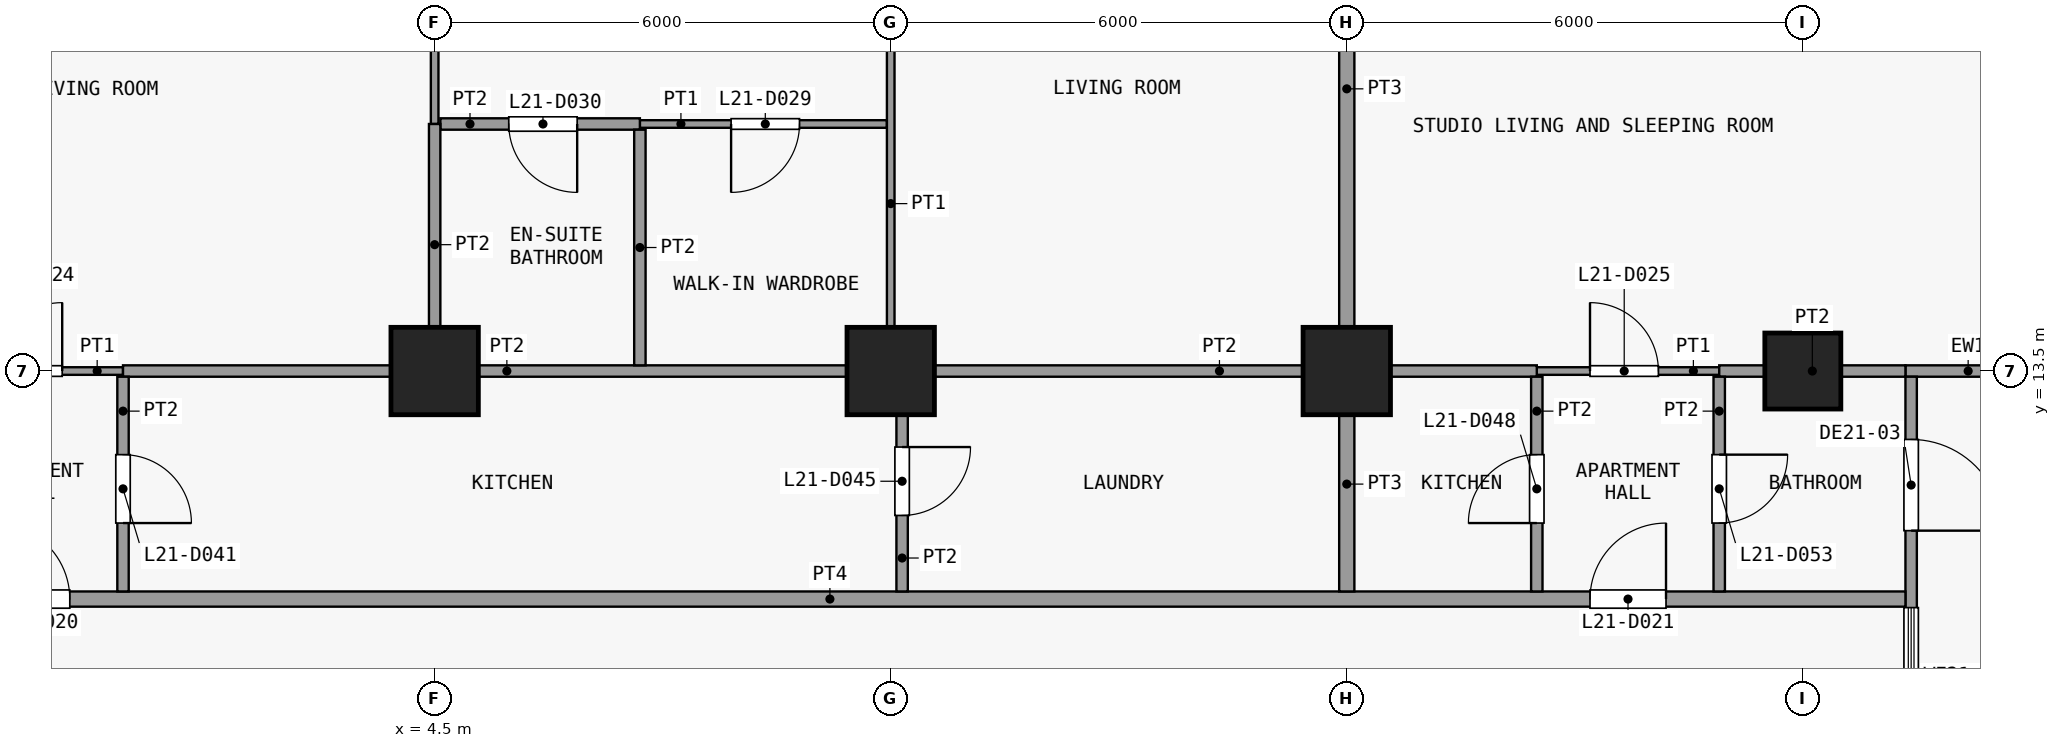
"""IFC4 building model, lengths in metres.
Left out: names, types, materials, properties, quantities, classifications, styles, units other than length and angle.
Written with IfcOpenShell. Run it as: python <this file> out.ifc"""

import sys

from ifc_helpers import new_model, si_unit, direction, frame, frame_2d, origin, origin_2d, place, context, subcontext, project, spatial, rectangle, extrude, element, fill, save


model = new_model("IFC4")
c1 = context("Model", 3, precision=1e-05, world=origin(), true_north=direction((0.0, 1.0)))
c2 = subcontext(c1, "Body", "Model", "MODEL_VIEW")
j1 = project(units=[si_unit("LENGTHUNIT", "METRE"), si_unit("PLANEANGLEUNIT", "RADIAN")], contexts=[c1])
p1 = place(None, origin())
s1 = spatial("IfcSite", under=j1, at=p1, CompositionType="ELEMENT")
p2 = place(p1, origin())
s2 = spatial("IfcBuilding", under=s1, at=p2, CompositionType="ELEMENT")
p3 = place(p2, frame((0.0, 0.0, 88.3)))
s3 = spatial("IfcBuildingStorey", under=s2, at=p3, CompositionType="ELEMENT", Elevation=88.3)
for number, where, z_axis, x_axis in (
    (1, (4.5, 13.5, 0.0), (0.0, 0.0, 1.0), (1.0, 0.0, 0.0)),
    (2, (10.5, 13.5, 0.0), (0.0, 0.0, 1.0), (1.0, 0.0, 0.0)),
    (3, (16.5, 13.5, 0.0), (0.0, 0.0, 1.0), (1.0, 0.0, 0.0)),
):
    element("IfcColumn", number, at=place(p3, frame(where, z_axis=z_axis, x_axis=x_axis)), inside=s3, PredefinedType="COLUMN", context=c2, shape_type="SweptSolid", body=[
        extrude(rectangle(XDim=1.15, YDim=1.15, at=origin_2d()), origin(), (0.0, 0.0, 1.0), 3.6),
    ])
p4 = place(p3, frame((22.5, 13.5, 0.0), z_axis=(0.0, 0.0, 1.0), x_axis=(1.0, 0.0, 0.0)))
e4 = element("IfcColumn", 4, at=p4, inside=s3, PredefinedType="COLUMN", context=c2, shape_type="SweptSolid", body=[
    extrude(rectangle(XDim=1.0, YDim=1.0, at=origin_2d()), origin(), (0.0, 0.0, 1.0), 3.6),
])
p5 = place(p3, frame((23.85, 13.5, 0.0), z_axis=(0.0, 0.0, 1.0), x_axis=(1.0, 0.0, 0.0)))
e5 = element("IfcWall", 5, at=p5, inside=s3, PredefinedType="SOLIDWALL", context=c2, shape_type="SweptSolid", body=[
    extrude(rectangle(XDim=1.65, YDim=0.15, at=frame_2d((0.825, 0.0))), origin(), (0.0, 0.0, 1.0), 3.3),
])
p6 = place(p3, frame((23.925, 13.425, 0.0), z_axis=(0.0, 0.0, 1.0), x_axis=(0.0, -1.0, 0.0)))
e6 = element("IfcWall", 6, at=p6, inside=s3, PredefinedType="SOLIDWALL", context=c2, shape_type="SweptSolid", body=[
    extrude(rectangle(XDim=5.85, YDim=0.15, at=frame_2d((2.925, 0.0))), origin(), (0.0, 0.0, 1.0), 3.3),
])
p7 = place(p6, frame((0.825, 0.0, 0.0)))
e7 = element("IfcOpeningElement", 7, at=p7, cuts=e6, PredefinedType="OPENING", context=c2, shape_type="SweptSolid", body=[
    extrude(rectangle(XDim=1.2, YDim=2.4, at=frame_2d((0.6, 1.2))), frame((0.0, 0.085, 0.0), z_axis=(0.0, -1.0, 0.0), x_axis=(1.0, 0.0, 0.0)), (0.0, 0.0, 1.0), 0.17),
])
p8 = place(p6, frame((3.038, 0.0, 0.9)))
e8 = element("IfcOpeningElement", 8, at=p8, cuts=e6, PredefinedType="OPENING", context=c2, shape_type="SweptSolid", body=[
    extrude(rectangle(XDim=1.8, YDim=2.1, at=frame_2d((0.9, 1.05))), frame((0.0, 0.085, 0.0), z_axis=(0.0, -1.0, 0.0), x_axis=(1.0, 0.0, 0.0)), (0.0, 0.0, 1.0), 0.17),
])
p9 = place(p3, frame((-25.35, 10.5, 0.0), z_axis=(0.0, 0.0, 1.0), x_axis=(1.0, 0.0, 0.0)))
e9 = element("IfcWall", 9, at=p9, inside=s3, PredefinedType="PARTITIONING", context=c2, shape_type="SweptSolid", body=[
    extrude(rectangle(XDim=49.2, YDim=0.2, at=frame_2d((24.6, 0.0))), origin(), (0.0, 0.0, 1.0), 3.3),
])
p10 = place(p9, frame((7.05, 0.0, 0.0)))
e10 = element("IfcOpeningElement", 10, at=p10, cuts=e9, PredefinedType="OPENING", context=c2, shape_type="SweptSolid", body=[
    extrude(rectangle(XDim=1.0, YDim=2.1, at=frame_2d((0.5, 1.05))), frame((0.0, 0.11, 0.0), z_axis=(0.0, -1.0, 0.0), x_axis=(1.0, 0.0, 0.0)), (0.0, 0.0, 1.0), 0.22),
])
p11 = place(p9, frame((15.55, 0.0, 0.0)))
e11 = element("IfcOpeningElement", 11, at=p11, cuts=e9, PredefinedType="OPENING", context=c2, shape_type="SweptSolid", body=[
    extrude(rectangle(XDim=1.0, YDim=2.1, at=frame_2d((0.5, 1.05))), frame((0.0, 0.11, 0.0), z_axis=(0.0, -1.0, 0.0), x_axis=(1.0, 0.0, 0.0)), (0.0, 0.0, 1.0), 0.22),
])
p12 = place(p9, frame((24.05, 0.0, 0.0)))
e12 = element("IfcOpeningElement", 12, at=p12, cuts=e9, PredefinedType="OPENING", context=c2, shape_type="SweptSolid", body=[
    extrude(rectangle(XDim=1.0, YDim=2.1, at=frame_2d((0.5, 1.05))), frame((0.0, 0.11, 0.0), z_axis=(0.0, -1.0, 0.0), x_axis=(1.0, 0.0, 0.0)), (0.0, 0.0, 1.0), 0.22),
])
p13 = place(p9, frame((45.05, 0.0, 0.0)))
e13 = element("IfcOpeningElement", 13, at=p13, cuts=e9, PredefinedType="OPENING", context=c2, shape_type="SweptSolid", body=[
    extrude(rectangle(XDim=1.0, YDim=2.1, at=frame_2d((0.5, 1.05))), frame((0.0, 0.11, 0.0), z_axis=(0.0, -1.0, 0.0), x_axis=(1.0, 0.0, 0.0)), (0.0, 0.0, 1.0), 0.22),
])
p14 = place(p3, frame((-2.0, 13.5, 0.0), z_axis=(0.0, 0.0, 1.0), x_axis=(1.0, 0.0, 0.0)))
e14 = element("IfcWall", 14, at=p14, inside=s3, PredefinedType="PARTITIONING", context=c2, shape_type="SweptSolid", body=[
    extrude(rectangle(XDim=2.4, YDim=0.1, at=frame_2d((1.2, 0.0))), origin(), (0.0, 0.0, 1.0), 3.3),
])
p15 = place(p14, frame((0.7, 0.0, 0.0)))
e15 = element("IfcOpeningElement", 15, at=p15, cuts=e14, PredefinedType="OPENING", context=c2, shape_type="SweptSolid", body=[
    extrude(rectangle(XDim=0.9, YDim=2.1, at=frame_2d((0.45, 1.05))), frame((0.0, 0.06, 0.0), z_axis=(0.0, -1.0, 0.0), x_axis=(1.0, 0.0, 0.0)), (0.0, 0.0, 1.0), 0.12),
])
p16 = place(p3, frame((19.0, 13.5, 0.0), z_axis=(0.0, 0.0, 1.0), x_axis=(1.0, 0.0, 0.0)))
e16 = element("IfcWall", 16, at=p16, inside=s3, PredefinedType="PARTITIONING", context=c2, shape_type="SweptSolid", body=[
    extrude(rectangle(XDim=2.4, YDim=0.1, at=frame_2d((1.2, 0.0))), origin(), (0.0, 0.0, 1.0), 3.3),
])
p17 = place(p16, frame((0.7, 0.0, 0.0)))
e17 = element("IfcOpeningElement", 17, at=p17, cuts=e16, PredefinedType="OPENING", context=c2, shape_type="SweptSolid", body=[
    extrude(rectangle(XDim=0.9, YDim=2.1, at=frame_2d((0.45, 1.05))), frame((0.0, 0.06, 0.0), z_axis=(0.0, -1.0, 0.0), x_axis=(1.0, 0.0, 0.0)), (0.0, 0.0, 1.0), 0.12),
])
p18 = place(p3, frame((0.4, 13.5, 0.0), z_axis=(0.0, 0.0, 1.0), x_axis=(1.0, 0.0, 0.0)))
e18 = element("IfcWall", 18, at=p18, inside=s3, PredefinedType="PARTITIONING", context=c2, shape_type="SweptSolid", body=[
    extrude(rectangle(XDim=10.1, YDim=0.15, at=frame_2d((5.05, 0.0))), origin(), (0.0, 0.0, 1.0), 3.3),
])
p19 = place(p3, frame((10.65, 13.5, 0.0), z_axis=(0.0, 0.0, 1.0), x_axis=(1.0, 0.0, 0.0)))
e19 = element("IfcWall", 19, at=p19, inside=s3, PredefinedType="PARTITIONING", context=c2, shape_type="SweptSolid", body=[
    extrude(rectangle(XDim=8.35, YDim=0.15, at=frame_2d((4.175, 0.0))), origin(), (0.0, 0.0, 1.0), 3.3),
])
p20 = place(p3, frame((21.4, 13.5, 0.0), z_axis=(0.0, 0.0, 1.0), x_axis=(1.0, 0.0, 0.0)))
e20 = element("IfcWall", 20, at=p20, inside=s3, PredefinedType="PARTITIONING", context=c2, shape_type="SweptSolid", body=[
    extrude(rectangle(XDim=2.45, YDim=0.15, at=frame_2d((1.225, 0.0))), origin(), (0.0, 0.0, 1.0), 3.3),
])
p21 = place(p3, frame((7.2, 16.75, 0.0), z_axis=(0.0, 0.0, 1.0), x_axis=(1.0, 0.0, 0.0)))
e21 = element("IfcWall", 21, at=p21, inside=s3, PredefinedType="PARTITIONING", context=c2, shape_type="SweptSolid", body=[
    extrude(rectangle(XDim=3.25, YDim=0.1, at=frame_2d((1.625, 0.0))), origin(), (0.0, 0.0, 1.0), 3.3),
])
p22 = place(p21, frame((1.2, 0.0, 0.0)))
e22 = element("IfcOpeningElement", 22, at=p22, cuts=e21, PredefinedType="OPENING", context=c2, shape_type="SweptSolid", body=[
    extrude(rectangle(XDim=0.9, YDim=2.1, at=frame_2d((0.45, 1.05))), frame((0.0, 0.06, 0.0), z_axis=(0.0, -1.0, 0.0), x_axis=(1.0, 0.0, 0.0)), (0.0, 0.0, 1.0), 0.12),
])
p23 = place(p3, frame((4.575, 16.75, 0.0), z_axis=(0.0, 0.0, 1.0), x_axis=(1.0, 0.0, 0.0)))
e23 = element("IfcWall", 23, at=p23, inside=s3, PredefinedType="PARTITIONING", context=c2, shape_type="SweptSolid", body=[
    extrude(rectangle(XDim=2.625, YDim=0.15, at=frame_2d((1.312, 0.0))), origin(), (0.0, 0.0, 1.0), 3.3),
])
p24 = place(p23, frame((0.9, 0.0, 0.0)))
e24 = element("IfcOpeningElement", 24, at=p24, cuts=e23, PredefinedType="OPENING", context=c2, shape_type="SweptSolid", body=[
    extrude(rectangle(XDim=0.9, YDim=2.1, at=frame_2d((0.45, 1.05))), frame((0.0, 0.085, 0.0), z_axis=(0.0, -1.0, 0.0), x_axis=(1.0, 0.0, 0.0)), (0.0, 0.0, 1.0), 0.17),
])
p25 = place(p3, frame((0.4, 10.6, 0.0), z_axis=(0.0, 0.0, 1.0), x_axis=(0.0, 1.0, 0.0)))
e25 = element("IfcWall", 25, at=p25, inside=s3, PredefinedType="PARTITIONING", context=c2, shape_type="SweptSolid", body=[
    extrude(rectangle(XDim=2.825, YDim=0.15, at=frame_2d((1.413, 0.0))), origin(), (0.0, 0.0, 1.0), 3.3),
])
p26 = place(p25, frame((0.9, 0.0, 0.0)))
e26 = element("IfcOpeningElement", 26, at=p26, cuts=e25, PredefinedType="OPENING", context=c2, shape_type="SweptSolid", body=[
    extrude(rectangle(XDim=0.9, YDim=2.1, at=frame_2d((0.45, 1.05))), frame((0.0, 0.085, 0.0), z_axis=(0.0, -1.0, 0.0), x_axis=(1.0, 0.0, 0.0)), (0.0, 0.0, 1.0), 0.17),
])
p27 = place(p3, frame((4.5, 16.75, 0.0), z_axis=(0.0, 0.0, 1.0), x_axis=(0.0, 1.0, 0.0)))
e27 = element("IfcWall", 27, at=p27, inside=s3, PredefinedType="PARTITIONING", context=c2, shape_type="SweptSolid", body=[
    extrude(rectangle(XDim=4.1, YDim=0.1, at=frame_2d((2.05, 0.0))), origin(), (0.0, 0.0, 1.0), 3.3),
])
p28 = place(p27, frame((1.2, 0.0, 0.0)))
e28 = element("IfcOpeningElement", 28, at=p28, cuts=e27, PredefinedType="OPENING", context=c2, shape_type="SweptSolid", body=[
    extrude(rectangle(XDim=0.9, YDim=2.1, at=frame_2d((0.45, 1.05))), frame((0.0, 0.06, 0.0), z_axis=(0.0, -1.0, 0.0), x_axis=(1.0, 0.0, 0.0)), (0.0, 0.0, 1.0), 0.12),
])
p29 = place(p3, frame((4.5, 13.575, 0.0), z_axis=(0.0, 0.0, 1.0), x_axis=(0.0, 1.0, 0.0)))
e29 = element("IfcWall", 29, at=p29, inside=s3, PredefinedType="PARTITIONING", context=c2, shape_type="SweptSolid", body=[
    extrude(rectangle(XDim=3.175, YDim=0.15, at=frame_2d((1.587, 0.0))), origin(), (0.0, 0.0, 1.0), 3.3),
])
p30 = place(p3, frame((7.2, 13.575, 0.0), z_axis=(0.0, 0.0, 1.0), x_axis=(0.0, 1.0, 0.0)))
e30 = element("IfcWall", 30, at=p30, inside=s3, PredefinedType="PARTITIONING", context=c2, shape_type="SweptSolid", body=[
    extrude(rectangle(XDim=3.1, YDim=0.15, at=frame_2d((1.55, 0.0))), origin(), (0.0, 0.0, 1.0), 3.3),
])
p31 = place(p3, frame((10.5, 13.575, 0.0), z_axis=(0.0, 0.0, 1.0), x_axis=(0.0, 1.0, 0.0)))
e31 = element("IfcWall", 31, at=p31, inside=s3, PredefinedType="PARTITIONING", context=c2, shape_type="SweptSolid", body=[
    extrude(rectangle(XDim=7.275, YDim=0.1, at=frame_2d((3.638, 0.0))), origin(), (0.0, 0.0, 1.0), 3.3),
])
p32 = place(p31, frame((4.375, 0.0, 0.0)))
e32 = element("IfcOpeningElement", 32, at=p32, cuts=e31, PredefinedType="OPENING", context=c2, shape_type="SweptSolid", body=[
    extrude(rectangle(XDim=0.9, YDim=2.1, at=frame_2d((0.45, 1.05))), frame((0.0, 0.06, 0.0), z_axis=(0.0, -1.0, 0.0), x_axis=(1.0, 0.0, 0.0)), (0.0, 0.0, 1.0), 0.12),
])
p33 = place(p3, frame((10.65, 10.6, 0.0), z_axis=(0.0, 0.0, 1.0), x_axis=(0.0, 1.0, 0.0)))
e33 = element("IfcWall", 33, at=p33, inside=s3, PredefinedType="PARTITIONING", context=c2, shape_type="SweptSolid", body=[
    extrude(rectangle(XDim=2.825, YDim=0.15, at=frame_2d((1.413, 0.0))), origin(), (0.0, 0.0, 1.0), 3.3),
])
p34 = place(p33, frame((1.0, 0.0, 0.0)))
e34 = element("IfcOpeningElement", 34, at=p34, cuts=e33, PredefinedType="OPENING", context=c2, shape_type="SweptSolid", body=[
    extrude(rectangle(XDim=0.9, YDim=2.1, at=frame_2d((0.45, 1.05))), frame((0.0, 0.085, 0.0), z_axis=(0.0, -1.0, 0.0), x_axis=(1.0, 0.0, 0.0)), (0.0, 0.0, 1.0), 0.17),
])
p35 = place(p3, frame((16.5, 10.6, 0.0), z_axis=(0.0, 0.0, 1.0), x_axis=(0.0, 1.0, 0.0)))
e35 = element("IfcWall", 35, at=p35, inside=s3, PredefinedType="PARTITIONING", context=c2, shape_type="SweptSolid", body=[
    extrude(rectangle(XDim=2.825, YDim=0.2, at=frame_2d((1.413, 0.0))), origin(), (0.0, 0.0, 1.0), 3.3),
])
p36 = place(p3, frame((16.5, 13.575, 0.0), z_axis=(0.0, 0.0, 1.0), x_axis=(0.0, 1.0, 0.0)))
e36 = element("IfcWall", 36, at=p36, inside=s3, PredefinedType="PARTITIONING", context=c2, shape_type="SweptSolid", body=[
    extrude(rectangle(XDim=7.275, YDim=0.2, at=frame_2d((3.638, 0.0))), origin(), (0.0, 0.0, 1.0), 3.3),
])
p37 = place(p3, frame((19.0, 10.6, 0.0), z_axis=(0.0, 0.0, 1.0), x_axis=(0.0, 1.0, 0.0)))
e37 = element("IfcWall", 37, at=p37, inside=s3, PredefinedType="PARTITIONING", context=c2, shape_type="SweptSolid", body=[
    extrude(rectangle(XDim=2.825, YDim=0.15, at=frame_2d((1.413, 0.0))), origin(), (0.0, 0.0, 1.0), 3.3),
])
p38 = place(p37, frame((0.9, 0.0, 0.0)))
e38 = element("IfcOpeningElement", 38, at=p38, cuts=e37, PredefinedType="OPENING", context=c2, shape_type="SweptSolid", body=[
    extrude(rectangle(XDim=0.9, YDim=2.1, at=frame_2d((0.45, 1.05))), frame((0.0, 0.085, 0.0), z_axis=(0.0, -1.0, 0.0), x_axis=(1.0, 0.0, 0.0)), (0.0, 0.0, 1.0), 0.17),
])
p39 = place(p3, frame((21.4, 10.6, 0.0), z_axis=(0.0, 0.0, 1.0), x_axis=(0.0, 1.0, 0.0)))
e39 = element("IfcWall", 39, at=p39, inside=s3, PredefinedType="PARTITIONING", context=c2, shape_type="SweptSolid", body=[
    extrude(rectangle(XDim=2.825, YDim=0.15, at=frame_2d((1.413, 0.0))), origin(), (0.0, 0.0, 1.0), 3.3),
])
p40 = place(p39, frame((0.9, 0.0, 0.0)))
e40 = element("IfcOpeningElement", 40, at=p40, cuts=e39, PredefinedType="OPENING", context=c2, shape_type="SweptSolid", body=[
    extrude(rectangle(XDim=0.9, YDim=2.1, at=frame_2d((0.45, 1.05))), frame((0.0, 0.085, 0.0), z_axis=(0.0, -1.0, 0.0), x_axis=(1.0, 0.0, 0.0)), (0.0, 0.0, 1.0), 0.17),
])
p41 = place(p7, origin())
e41 = element("IfcDoor", 41, at=p41, inside=s3, OperationType="SINGLE_SWING_RIGHT", PredefinedType="DOOR", context=c2, shape_type="SweptSolid", body=[
    extrude(rectangle(XDim=1.2, YDim=2.4, at=frame_2d((0.6, 1.2))), frame((0.0, 0.025, 0.0), z_axis=(0.0, -1.0, 0.0), x_axis=(1.0, 0.0, 0.0)), (0.0, 0.0, 1.0), 0.05),
])
fill(e7, e41)
p42 = place(p8, origin())
e42 = element("IfcWindow", 42, at=p42, inside=s3, PartitioningType="SINGLE_PANEL", PredefinedType="WINDOW", context=c2, shape_type="SweptSolid", body=[
    extrude(rectangle(XDim=1.8, YDim=2.1, at=frame_2d((0.9, 1.05))), frame((0.0, 0.03, 0.0), z_axis=(0.0, -1.0, 0.0), x_axis=(1.0, 0.0, 0.0)), (0.0, 0.0, 1.0), 0.06),
])
fill(e8, e42)
p43 = place(p12, origin())
e43 = element("IfcDoor", 43, at=p43, inside=s3, OperationType="SINGLE_SWING_RIGHT", PredefinedType="DOOR", context=c2, shape_type="SweptSolid", body=[
    extrude(rectangle(XDim=1.0, YDim=2.1, at=frame_2d((0.5, 1.05))), frame((0.0, 0.025, 0.0), z_axis=(0.0, -1.0, 0.0), x_axis=(1.0, 0.0, 0.0)), (0.0, 0.0, 1.0), 0.05),
])
fill(e12, e43)
p44 = place(p13, origin())
e44 = element("IfcDoor", 44, at=p44, inside=s3, OperationType="SINGLE_SWING_LEFT", PredefinedType="DOOR", context=c2, shape_type="SweptSolid", body=[
    extrude(rectangle(XDim=1.0, YDim=2.1, at=frame_2d((0.5, 1.05))), frame((0.0, 0.025, 0.0), z_axis=(0.0, -1.0, 0.0), x_axis=(1.0, 0.0, 0.0)), (0.0, 0.0, 1.0), 0.05),
])
fill(e13, e44)
p45 = place(p15, origin())
e45 = element("IfcDoor", 45, at=p45, inside=s3, OperationType="SINGLE_SWING_LEFT", PredefinedType="DOOR", context=c2, shape_type="SweptSolid", body=[
    extrude(rectangle(XDim=0.9, YDim=2.1, at=frame_2d((0.45, 1.05))), frame((0.0, 0.025, 0.0), z_axis=(0.0, -1.0, 0.0), x_axis=(1.0, 0.0, 0.0)), (0.0, 0.0, 1.0), 0.05),
])
fill(e15, e45)
p46 = place(p17, origin())
e46 = element("IfcDoor", 46, at=p46, inside=s3, OperationType="SINGLE_SWING_RIGHT", PredefinedType="DOOR", context=c2, shape_type="SweptSolid", body=[
    extrude(rectangle(XDim=0.9, YDim=2.1, at=frame_2d((0.45, 1.05))), frame((0.0, 0.025, 0.0), z_axis=(0.0, -1.0, 0.0), x_axis=(1.0, 0.0, 0.0)), (0.0, 0.0, 1.0), 0.05),
])
fill(e17, e46)
p47 = place(p22, origin())
e47 = element("IfcDoor", 47, at=p47, inside=s3, OperationType="SINGLE_SWING_LEFT", PredefinedType="DOOR", context=c2, shape_type="SweptSolid", body=[
    extrude(rectangle(XDim=0.9, YDim=2.1, at=frame_2d((0.45, 1.05))), frame((0.0, 0.025, 0.0), z_axis=(0.0, -1.0, 0.0), x_axis=(1.0, 0.0, 0.0)), (0.0, 0.0, 1.0), 0.05),
])
fill(e22, e47)
p48 = place(p24, origin())
e48 = element("IfcDoor", 48, at=p48, inside=s3, OperationType="SINGLE_SWING_RIGHT", PredefinedType="DOOR", context=c2, shape_type="SweptSolid", body=[
    extrude(rectangle(XDim=0.9, YDim=2.1, at=frame_2d((0.45, 1.05))), frame((0.0, 0.025, 0.0), z_axis=(0.0, -1.0, 0.0), x_axis=(1.0, 0.0, 0.0)), (0.0, 0.0, 1.0), 0.05),
])
fill(e24, e48)
p49 = place(p26, origin())
e49 = element("IfcDoor", 49, at=p49, inside=s3, OperationType="SINGLE_SWING_LEFT", PredefinedType="DOOR", context=c2, shape_type="SweptSolid", body=[
    extrude(rectangle(XDim=0.9, YDim=2.1, at=frame_2d((0.45, 1.05))), frame((0.0, 0.025, 0.0), z_axis=(0.0, -1.0, 0.0), x_axis=(1.0, 0.0, 0.0)), (0.0, 0.0, 1.0), 0.05),
])
fill(e26, e49)
p50 = place(p34, origin())
e50 = element("IfcDoor", 50, at=p50, inside=s3, OperationType="SINGLE_SWING_RIGHT", PredefinedType="DOOR", context=c2, shape_type="SweptSolid", body=[
    extrude(rectangle(XDim=0.9, YDim=2.1, at=frame_2d((0.45, 1.05))), frame((0.0, 0.025, 0.0), z_axis=(0.0, -1.0, 0.0), x_axis=(1.0, 0.0, 0.0)), (0.0, 0.0, 1.0), 0.05),
])
fill(e34, e50)
p51 = place(p38, origin())
e51 = element("IfcDoor", 51, at=p51, inside=s3, OperationType="SINGLE_SWING_RIGHT", PredefinedType="DOOR", context=c2, shape_type="SweptSolid", body=[
    extrude(rectangle(XDim=0.9, YDim=2.1, at=frame_2d((0.45, 1.05))), frame((0.0, 0.025, 0.0), z_axis=(0.0, -1.0, 0.0), x_axis=(1.0, 0.0, 0.0)), (0.0, 0.0, 1.0), 0.05),
])
fill(e38, e51)
p52 = place(p40, origin())
e52 = element("IfcDoor", 52, at=p52, inside=s3, OperationType="SINGLE_SWING_RIGHT", PredefinedType="DOOR", context=c2, shape_type="SweptSolid", body=[
    extrude(rectangle(XDim=0.9, YDim=2.1, at=frame_2d((0.45, 1.05))), frame((0.0, 0.025, 0.0), z_axis=(0.0, -1.0, 0.0), x_axis=(1.0, 0.0, 0.0)), (0.0, 0.0, 1.0), 0.05),
])
fill(e40, e52)
save(model, sys.argv[1])
